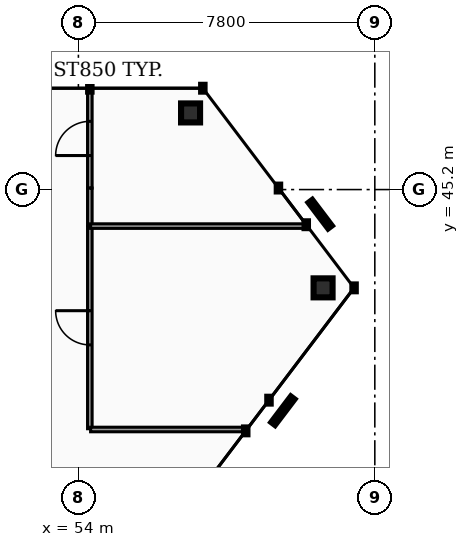
"""IFC4 building model, lengths in metres.
Left out: names, types, materials, properties, quantities, classifications, styles, units other than length and angle.
Written with IfcOpenShell. Run it as: python <this file> out.ifc"""

import sys

from ifc_helpers import new_model, si_unit, direction, frame, frame_2d, origin, origin_2d, place, context, subcontext, project, spatial, rectangle, hollow_rectangle, extrude, element, fill, save


model = new_model("IFC4")
c1 = context("Model", 3, precision=1e-05, world=origin(), true_north=direction((0.0, 1.0)))
c2 = subcontext(c1, "Body", "Model", "MODEL_VIEW")
j1 = project(units=[si_unit("LENGTHUNIT", "METRE"), si_unit("PLANEANGLEUNIT", "RADIAN")], contexts=[c1])
p1 = place(None, origin())
s1 = spatial("IfcSite", under=j1, at=p1, CompositionType="ELEMENT")
p2 = place(p1, origin())
s2 = spatial("IfcBuilding", under=s1, at=p2, CompositionType="ELEMENT")
p3 = place(p2, frame((0.0, 0.0, 258.4)))
s3 = spatial("IfcBuildingStorey", under=s2, at=p3, CompositionType="ELEMENT", Elevation=258.4)
for number, where, z_axis, x_axis in (
    (1, (56.952, 47.217, 0.0), (0.0, 0.0, 1.0), (1.0, 0.0, 0.0)),
    (2, (60.438, 42.614, 0.0), (0.0, 0.0, 1.0), (1.0, 0.0, 0.0)),
):
    element("IfcColumn", number, at=place(p3, frame(where, z_axis=z_axis, x_axis=x_axis)), inside=s3, PredefinedType="COLUMN", context=c2, shape_type="SweptSolid", body=[
        extrude(hollow_rectangle(XDim=0.5, YDim=0.5, WallThickness=0.025, at=origin_2d()), origin(), (0.0, 0.0, 1.0), 3.18),
    ])
p4 = place(p3, frame((54.301, 45.239, 0.0), z_axis=(0.0, 0.0, 1.0), x_axis=(0.0, 1.0, 0.0)))
e3 = element("IfcWall", 3, at=p4, inside=s3, PredefinedType="PARTITIONING", context=c2, shape_type="SweptSolid", body=[
    extrude(rectangle(XDim=2.613, YDim=0.12, at=frame_2d((1.307, 0.0))), origin(), (0.0, 0.0, 1.0), 2.235),
])
p5 = place(p4, frame((0.856, 0.0, 0.0)))
e4 = element("IfcOpeningElement", 4, at=p5, cuts=e3, PredefinedType="OPENING", context=c2, shape_type="SweptSolid", body=[
    extrude(rectangle(XDim=0.9, YDim=2.05, at=frame_2d((0.45, 1.025))), frame((0.0, 0.07, 0.0), z_axis=(0.0, -1.0, 0.0), x_axis=(1.0, 0.0, 0.0)), (0.0, 0.0, 1.0), 0.14),
])
p6 = place(p3, frame((54.301, 44.259, 0.0), z_axis=(0.0, 0.0, 1.0), x_axis=(0.0, 1.0, 0.0)))
e5 = element("IfcWall", 5, at=p6, inside=s3, PredefinedType="PARTITIONING", context=c2, shape_type="SweptSolid", body=[
    extrude(rectangle(XDim=0.98, YDim=0.12, at=frame_2d((0.49, 0.0))), origin(), (0.0, 0.0, 1.0), 2.235),
])
p7 = place(p3, frame((54.301, 38.907, 0.0), z_axis=(0.0, 0.0, 1.0), x_axis=(0.0, 1.0, 0.0)))
e6 = element("IfcWall", 6, at=p7, inside=s3, PredefinedType="PARTITIONING", context=c2, shape_type="SweptSolid", body=[
    extrude(rectangle(XDim=5.312, YDim=0.12, at=frame_2d((2.656, 0.0))), origin(), (0.0, 0.0, 1.0), 2.235),
])
p8 = place(p7, frame((2.206, 0.0, 0.0)))
e7 = element("IfcOpeningElement", 7, at=p8, cuts=e6, PredefinedType="OPENING", context=c2, shape_type="SweptSolid", body=[
    extrude(rectangle(XDim=0.9, YDim=2.05, at=frame_2d((0.45, 1.025))), frame((0.0, 0.07, 0.0), z_axis=(0.0, -1.0, 0.0), x_axis=(1.0, 0.0, 0.0)), (0.0, 0.0, 1.0), 0.14),
])
p9 = place(p3, frame((54.321, 38.887, 0.0), z_axis=(0.0, 0.0, 1.0), x_axis=(1.0, 0.0, 0.0)))
e8 = element("IfcWall", 8, at=p9, inside=s3, PredefinedType="PARTITIONING", context=c2, shape_type="SweptSolid", body=[
    extrude(rectangle(XDim=4.095, YDim=0.12, at=frame_2d((2.047, 0.0))), origin(), (0.0, 0.0, 1.0), 2.235),
])
p10 = place(p3, frame((54.321, 44.239, 0.0), z_axis=(0.0, 0.0, 1.0), x_axis=(1.0, 0.0, 0.0)))
e9 = element("IfcWall", 9, at=p10, inside=s3, PredefinedType="PARTITIONING", context=c2, shape_type="SweptSolid", body=[
    extrude(rectangle(XDim=5.687, YDim=0.12, at=frame_2d((2.844, 0.0))), origin(), (0.0, 0.0, 1.0), 2.235),
])
p11 = place(p5, origin())
e10 = element("IfcDoor", 10, at=p11, inside=s3, OperationType="SINGLE_SWING_LEFT", PredefinedType="DOOR", context=c2, shape_type="SweptSolid", body=[
    extrude(rectangle(XDim=0.9, YDim=2.05, at=frame_2d((0.45, 1.025))), frame((0.0, 0.025, 0.0), z_axis=(0.0, -1.0, 0.0), x_axis=(1.0, 0.0, 0.0)), (0.0, 0.0, 1.0), 0.05),
])
fill(e4, e10)
p12 = place(p8, origin())
e11 = element("IfcDoor", 11, at=p12, inside=s3, OperationType="SINGLE_SWING_RIGHT", PredefinedType="DOOR", context=c2, shape_type="SweptSolid", body=[
    extrude(rectangle(XDim=0.9, YDim=2.05, at=frame_2d((0.45, 1.025))), frame((0.0, 0.025, 0.0), z_axis=(0.0, -1.0, 0.0), x_axis=(1.0, 0.0, 0.0)), (0.0, 0.0, 1.0), 0.05),
])
fill(e7, e11)
save(model, sys.argv[1])
